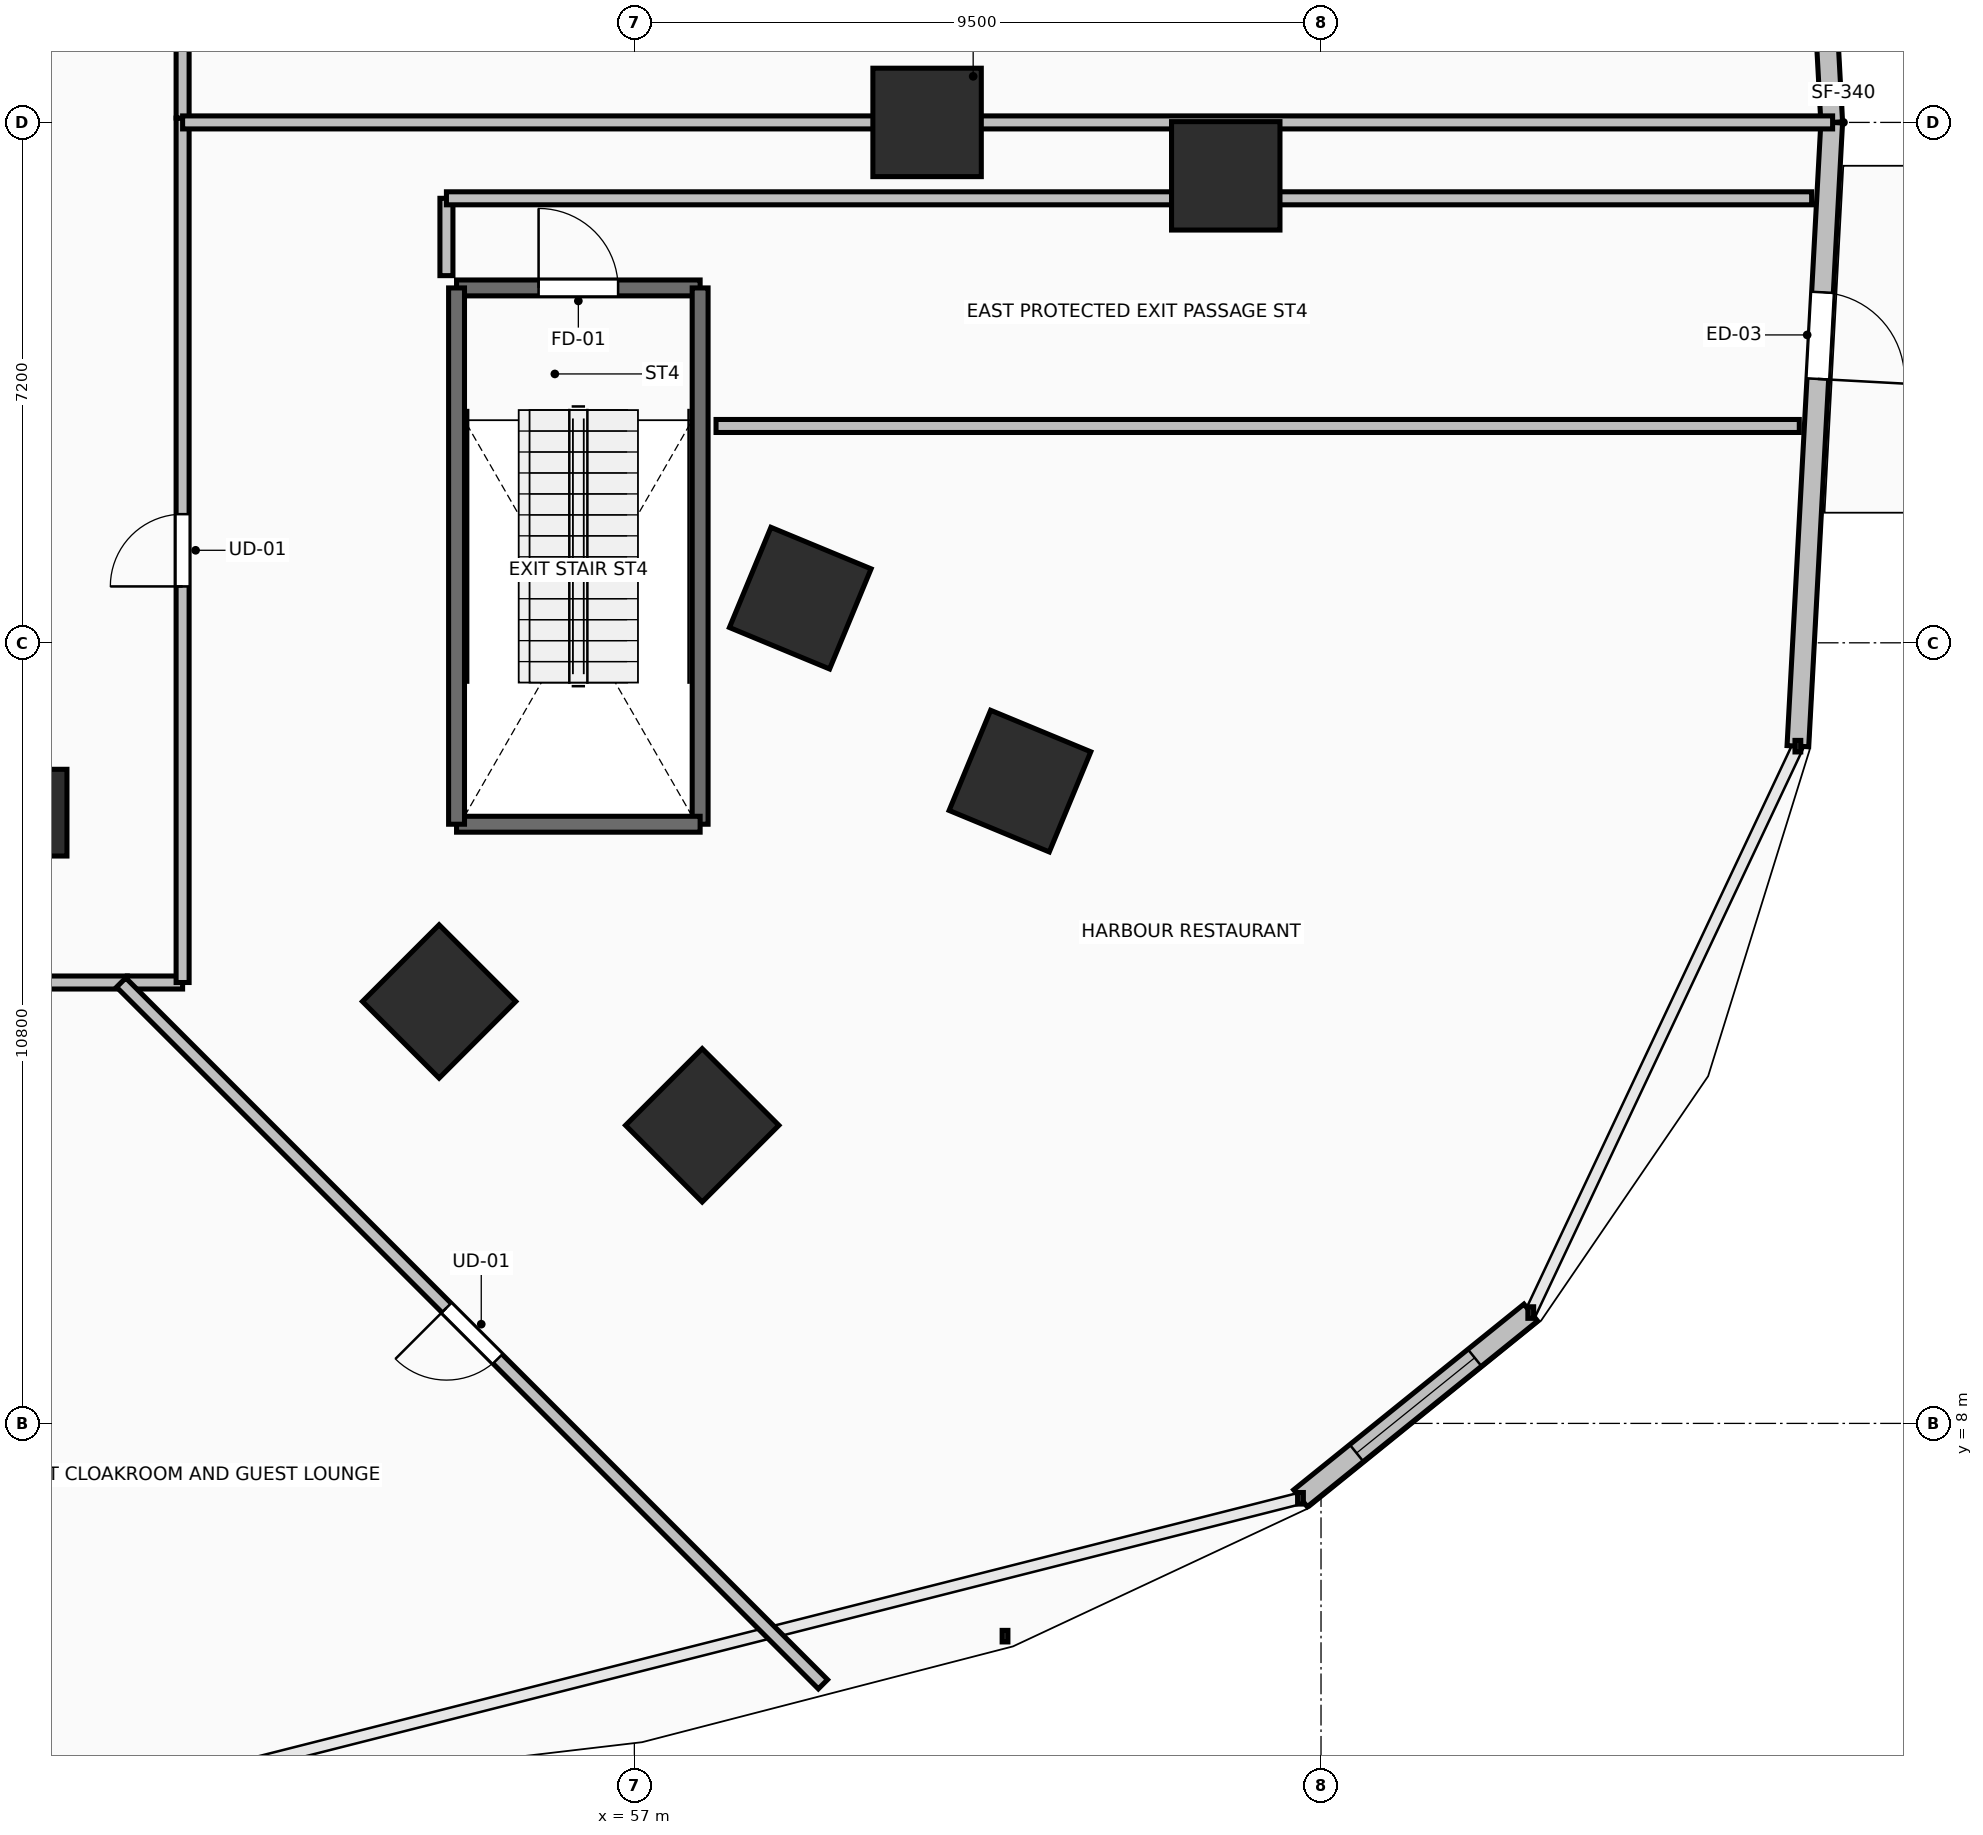
"""IFC4 building model, lengths in metres.
Left out: names, types, materials, properties, quantities, classifications, styles, units other than length and angle.
Written with IfcOpenShell. Run it as: python <this file> out.ifc"""

import sys

from ifc_helpers import new_model, si_unit, direction, frame, frame_2d, origin, origin_2d, place, context, subcontext, project, spatial, rectangle, extrude, element, fill, save


model = new_model("IFC4")
c1 = context("Model", 3, precision=1e-05, world=origin(), true_north=direction((0.0, 1.0)))
c2 = subcontext(c1, "Body", "Model", "MODEL_VIEW")
j1 = project(units=[si_unit("LENGTHUNIT", "METRE"), si_unit("PLANEANGLEUNIT", "RADIAN")], contexts=[c1])
p1 = place(None, origin())
s1 = spatial("IfcSite", under=j1, at=p1, CompositionType="ELEMENT")
p2 = place(p1, origin())
s2 = spatial("IfcBuilding", under=s1, at=p2, CompositionType="ELEMENT")
p3 = place(p2, origin())
s3 = spatial("IfcBuildingStorey", under=s2, at=p3, CompositionType="ELEMENT", Elevation=0.0)
for number, where, z_axis, x_axis in (
    (1, (61.05, 26.0, 0.0), (0.0, 0.0, 1.0), (1.0, 0.0, 0.0)),
    (2, (54.299, 13.838, 0.0), (0.0, 0.0, 1.0), (0.707, -0.707, 0.0)),
    (3, (59.295, 19.418, 0.0), (0.0, 0.0, 1.0), (0.924, -0.383, 0.0)),
    (4, (65.182, 25.261, 0.0), (0.0, 0.0, 1.0), (1.0, 0.0, 0.0)),
    (5, (57.939, 12.124, 0.0), (0.0, 0.0, 1.0), (0.707, -0.707, 0.0)),
    (6, (62.335, 16.886, 0.0), (0.0, 0.0, 1.0), (0.924, -0.383, 0.0)),
):
    element("IfcColumn", number, at=place(p3, frame(where, z_axis=z_axis, x_axis=x_axis)), inside=s3, PredefinedType="COLUMN", context=c2, shape_type="SweptSolid", body=[
        extrude(rectangle(XDim=1.5, YDim=1.5, at=origin_2d()), origin(), (0.0, 0.0, 1.0), 4.8),
    ])
p4 = place(p3, frame((48.75, 16.45, 0.0), z_axis=(0.0, 0.0, 1.0), x_axis=(1.0, 0.0, 0.0)))
e7 = element("IfcColumn", 7, at=p4, inside=s3, PredefinedType="PILASTER", context=c2, shape_type="SweptSolid", body=[
    extrude(rectangle(XDim=0.8, YDim=1.2, at=origin_2d()), origin(), (0.0, 0.0, 1.0), 4.8),
])
p5 = place(p3, frame((73.566, 26.0, 0.0), z_axis=(0.0, 0.0, 1.0), x_axis=(-0.054179266439, 0.998531224894, 0.0)))
e8 = element("IfcWall", 8, at=p5, inside=s3, PredefinedType="STANDARD", context=c2, shape_type="SweptSolid", body=[
    extrude(rectangle(XDim=8.643, YDim=0.3, at=frame_2d((4.321, 0.0))), origin(), (0.0, 0.0, 1.0), 4.48),
])
p6 = place(p5, frame((3.271, 0.0, 0.9)))
e9 = element("IfcOpeningElement", 9, at=p6, cuts=e8, PredefinedType="OPENING", context=c2, shape_type="SweptSolid", body=[
    extrude(rectangle(XDim=2.1, YDim=2.4, at=frame_2d((1.05, 1.2))), frame((0.0, 0.165, 0.0), z_axis=(0.0, -1.0, 0.0), x_axis=(1.0, 0.0, 0.0)), (0.0, 0.0, 1.0), 0.33),
])
p7 = place(p3, frame((66.216, 6.964, 0.0), z_axis=(0.0, 0.0, 1.0), x_axis=(0.778389533764, 0.627781597155, 0.0)))
e10 = element("IfcWall", 10, at=p7, inside=s3, PredefinedType="STANDARD", context=c2, shape_type="SweptSolid", body=[
    extrude(rectangle(XDim=4.093, YDim=0.3, at=frame_2d((2.046, 0.0))), origin(), (0.0, 0.0, 1.0), 4.48),
])
p8 = place(p7, frame((0.997, 0.0, 0.9)))
e11 = element("IfcOpeningElement", 11, at=p8, cuts=e10, PredefinedType="OPENING", context=c2, shape_type="SweptSolid", body=[
    extrude(rectangle(XDim=2.1, YDim=2.4, at=frame_2d((1.05, 1.2))), frame((0.0, 0.165, 0.0), z_axis=(0.0, -1.0, 0.0), x_axis=(1.0, 0.0, 0.0)), (0.0, 0.0, 1.0), 0.33),
])
p9 = place(p3, frame((73.097, 17.37, 0.0), z_axis=(0.0, 0.0, 1.0), x_axis=(0.054179266439, 0.998531224894, 0.0)))
e12 = element("IfcWall", 12, at=p9, inside=s3, PredefinedType="STANDARD", context=c2, shape_type="SweptSolid", body=[
    extrude(rectangle(XDim=8.643, YDim=0.3, at=frame_2d((4.321, 0.0))), origin(), (0.0, 0.0, 1.0), 4.48),
])
p10 = place(p9, frame((5.089, 0.0, 0.0)))
e13 = element("IfcOpeningElement", 13, at=p10, cuts=e12, PredefinedType="OPENING", context=c2, shape_type="SweptSolid", body=[
    extrude(rectangle(XDim=1.2, YDim=2.15, at=frame_2d((0.6, 1.075))), frame((0.0, 0.165, 0.0), z_axis=(0.0, -1.0, 0.0), x_axis=(1.0, 0.0, 0.0)), (0.0, 0.0, 1.0), 0.33),
])
p11 = place(p3, frame((54.54, 23.71, 0.0), z_axis=(0.0, 0.0, 1.0), x_axis=(1.0, 0.0, 0.0)))
e14 = element("IfcWall", 14, at=p11, inside=s3, PredefinedType="SOLIDWALL", context=c2, shape_type="SweptSolid", body=[
    extrude(rectangle(XDim=3.37, YDim=0.22, at=frame_2d((1.685, 0.0))), origin(), (0.0, 0.0, 1.0), 4.48),
])
p12 = place(p11, frame((1.135, 0.0, 0.0)))
e15 = element("IfcOpeningElement", 15, at=p12, cuts=e14, PredefinedType="OPENING", context=c2, shape_type="SweptSolid", body=[
    extrude(rectangle(XDim=1.1, YDim=2.15, at=frame_2d((0.55, 1.075))), frame((0.0, 0.125, 0.0), z_axis=(0.0, -1.0, 0.0), x_axis=(1.0, 0.0, 0.0)), (0.0, 0.0, 1.0), 0.25),
])
p13 = place(p3, frame((57.91, 23.71, 0.0), z_axis=(0.0, 0.0, 1.0), x_axis=(0.0, -1.0, 0.0)))
e16 = element("IfcWall", 16, at=p13, inside=s3, PredefinedType="SOLIDWALL", context=c2, shape_type="SweptSolid", body=[
    extrude(rectangle(XDim=7.42, YDim=0.22, at=frame_2d((3.71, 0.0))), origin(), (0.0, 0.0, 1.0), 4.48),
])
p14 = place(p3, frame((57.91, 16.29, 0.0), z_axis=(0.0, 0.0, 1.0), x_axis=(-1.0, 0.0, 0.0)))
e17 = element("IfcWall", 17, at=p14, inside=s3, PredefinedType="SOLIDWALL", context=c2, shape_type="SweptSolid", body=[
    extrude(rectangle(XDim=3.37, YDim=0.22, at=frame_2d((1.685, 0.0))), origin(), (0.0, 0.0, 1.0), 4.48),
])
p15 = place(p3, frame((54.54, 16.29, 0.0), z_axis=(0.0, 0.0, 1.0), x_axis=(0.0, 1.0, 0.0)))
e18 = element("IfcWall", 18, at=p15, inside=s3, PredefinedType="SOLIDWALL", context=c2, shape_type="SweptSolid", body=[
    extrude(rectangle(XDim=7.42, YDim=0.22, at=frame_2d((3.71, 0.0))), origin(), (0.0, 0.0, 1.0), 4.48),
])
p16 = place(p3, frame((42.994, 14.1, 0.0), z_axis=(0.0, 0.0, 1.0), x_axis=(1.0, 0.0, 0.0)))
e19 = element("IfcWall", 19, at=p16, inside=s3, PredefinedType="PARTITIONING", context=c2, shape_type="SweptSolid", body=[
    extrude(rectangle(XDim=6.991, YDim=0.18, at=frame_2d((3.496, 0.0))), origin(), (0.0, 0.0, 1.0), 3.672),
])
p17 = place(p16, frame((2.896, 0.0, 0.0)))
e20 = element("IfcOpeningElement", 20, at=p17, cuts=e19, PredefinedType="OPENING", context=c2, shape_type="SweptSolid", body=[
    extrude(rectangle(XDim=1.2, YDim=2.15, at=frame_2d((0.6, 1.075))), frame((0.0, 0.105, 0.0), z_axis=(0.0, -1.0, 0.0), x_axis=(1.0, 0.0, 0.0)), (0.0, 0.0, 1.0), 0.21),
])
p18 = place(p3, frame((49.985, 14.1, 0.0), z_axis=(0.0, 0.0, 1.0), x_axis=(1.0, 0.0, 0.0)))
e21 = element("IfcWall", 21, at=p18, inside=s3, PredefinedType="PARTITIONING", context=c2, shape_type="SweptSolid", body=[
    extrude(rectangle(XDim=0.765, YDim=0.18, at=frame_2d((0.382, 0.0))), origin(), (0.0, 0.0, 1.0), 4.212),
])
p19 = place(p3, frame((50.75, 14.1, 0.0), z_axis=(0.0, 0.0, 1.0), x_axis=(0.0, 1.0, 0.0)))
e22 = element("IfcWall", 22, at=p19, inside=s3, PredefinedType="PARTITIONING", context=c2, shape_type="SweptSolid", body=[
    extrude(rectangle(XDim=11.96, YDim=0.18, at=frame_2d((5.98, 0.0))), origin(), (0.0, 0.0, 1.0), 3.672),
])
p20 = place(p19, frame((5.48, 0.0, 0.0)))
e23 = element("IfcOpeningElement", 23, at=p20, cuts=e22, PredefinedType="OPENING", context=c2, shape_type="SweptSolid", body=[
    extrude(rectangle(XDim=1.0, YDim=2.15, at=frame_2d((0.5, 1.075))), frame((0.0, 0.105, 0.0), z_axis=(0.0, -1.0, 0.0), x_axis=(1.0, 0.0, 0.0)), (0.0, 0.0, 1.0), 0.21),
])
p21 = place(p3, frame((50.75, 26.06, 0.0), z_axis=(0.0, 0.0, 1.0), x_axis=(0.0, 1.0, 0.0)))
e24 = element("IfcWall", 24, at=p21, inside=s3, PredefinedType="PARTITIONING", context=c2, shape_type="SweptSolid", body=[
    extrude(rectangle(XDim=9.89, YDim=0.18, at=frame_2d((4.945, 0.0))), origin(), (0.0, 0.0, 1.0), 3.672),
])
p22 = place(p21, frame((4.245, 0.0, 0.0)))
e25 = element("IfcOpeningElement", 25, at=p22, cuts=e24, PredefinedType="OPENING", context=c2, shape_type="SweptSolid", body=[
    extrude(rectangle(XDim=1.4, YDim=2.2, at=frame_2d((0.7, 1.1))), frame((0.0, 0.105, 0.0), z_axis=(0.0, -1.0, 0.0), x_axis=(1.0, 0.0, 0.0)), (0.0, 0.0, 1.0), 0.21),
])
p23 = place(p3, frame((59.609, 4.391, 0.0), z_axis=(0.0, 0.0, 1.0), x_axis=(-0.707106781187, 0.707106781187, 0.0)))
e26 = element("IfcWall", 26, at=p23, inside=s3, PredefinedType="PARTITIONING", context=c2, shape_type="SweptSolid", body=[
    extrude(rectangle(XDim=13.73, YDim=0.18, at=frame_2d((6.865, 0.0))), origin(), (0.0, 0.0, 1.0), 3.769),
])
p24 = place(p23, frame((6.365, 0.0, 0.0)))
e27 = element("IfcOpeningElement", 27, at=p24, cuts=e26, PredefinedType="OPENING", context=c2, shape_type="SweptSolid", body=[
    extrude(rectangle(XDim=1.0, YDim=2.15, at=frame_2d((0.5, 1.075))), frame((0.0, 0.105, 0.0), z_axis=(0.0, -1.0, 0.0), x_axis=(1.0, 0.0, 0.0)), (0.0, 0.0, 1.0), 0.21),
])
p25 = place(p3, frame((73.578, 26.0, 0.0), z_axis=(0.0, 0.0, 1.0), x_axis=(-1.0, 0.0, 0.0)))
e28 = element("IfcWall", 28, at=p25, inside=s3, PredefinedType="PARTITIONING", context=c2, shape_type="SweptSolid", body=[
    extrude(rectangle(XDim=22.828, YDim=0.18, at=frame_2d((11.414, 0.0))), origin(), (0.0, 0.0, 1.0), 3.672),
])
p26 = place(p3, frame((54.4, 24.95, 0.0), z_axis=(0.0, 0.0, 1.0), x_axis=(0.0, -1.0, 0.0)))
e29 = element("IfcWall", 29, at=p26, inside=s3, PredefinedType="PARTITIONING", context=c2, shape_type="SweptSolid", body=[
    extrude(rectangle(XDim=1.07, YDim=0.18, at=frame_2d((0.535, 0.0))), origin(), (0.0, 0.0, 1.0), 4.48),
])
p27 = place(p3, frame((58.13, 21.8, 0.0), z_axis=(0.0, 0.0, 1.0), x_axis=(1.0, 0.0, 0.0)))
e30 = element("IfcWall", 30, at=p27, inside=s3, PredefinedType="PARTITIONING", context=c2, shape_type="SweptSolid", body=[
    extrude(rectangle(XDim=14.987, YDim=0.18, at=frame_2d((7.494, 0.0))), origin(), (0.0, 0.0, 1.0), 3.769),
])
p28 = place(p3, frame((73.288, 24.95, 0.0), z_axis=(0.0, 0.0, 1.0), x_axis=(-1.0, 0.0, 0.0)))
e31 = element("IfcWall", 31, at=p28, inside=s3, PredefinedType="PARTITIONING", context=c2, shape_type="SweptSolid", body=[
    extrude(rectangle(XDim=18.888, YDim=0.18, at=frame_2d((9.444, 0.0))), origin(), (0.0, 0.0, 1.0), 4.162),
])
p29 = place(p8, origin())
e32 = element("IfcWindow", 32, at=p29, inside=s3, PartitioningType="SINGLE_PANEL", PredefinedType="WINDOW", context=c2, shape_type="SweptSolid", body=[
    extrude(rectangle(XDim=2.1, YDim=2.4, at=frame_2d((1.05, 1.2))), frame((0.0, 0.03, 0.0), z_axis=(0.0, -1.0, 0.0), x_axis=(1.0, 0.0, 0.0)), (0.0, 0.0, 1.0), 0.06),
])
fill(e11, e32)
p30 = place(p10, frame((1.2, 0.0, 0.0), z_axis=(0.0, 0.0, 1.0), x_axis=(-1.0, 0.0, 0.0)))
e33 = element("IfcDoor", 33, at=p30, inside=s3, OperationType="SINGLE_SWING_LEFT", PredefinedType="DOOR", context=c2, shape_type="SweptSolid", body=[
    extrude(rectangle(XDim=1.2, YDim=2.15, at=frame_2d((0.6, 1.075))), frame((0.0, 0.025, 0.0), z_axis=(0.0, -1.0, 0.0), x_axis=(1.0, 0.0, 0.0)), (0.0, 0.0, 1.0), 0.05),
])
fill(e13, e33)
p31 = place(p12, origin())
e34 = element("IfcDoor", 34, at=p31, inside=s3, OperationType="SINGLE_SWING_LEFT", PredefinedType="DOOR", context=c2, shape_type="SweptSolid", body=[
    extrude(rectangle(XDim=1.1, YDim=2.15, at=frame_2d((0.55, 1.075))), frame((0.0, 0.025, 0.0), z_axis=(0.0, -1.0, 0.0), x_axis=(1.0, 0.0, 0.0)), (0.0, 0.0, 1.0), 0.05),
])
fill(e15, e34)
p32 = place(p20, origin())
e35 = element("IfcDoor", 35, at=p32, inside=s3, OperationType="SINGLE_SWING_LEFT", PredefinedType="DOOR", context=c2, shape_type="SweptSolid", body=[
    extrude(rectangle(XDim=1.0, YDim=2.15, at=frame_2d((0.5, 1.075))), frame((0.0, 0.025, 0.0), z_axis=(0.0, -1.0, 0.0), x_axis=(1.0, 0.0, 0.0)), (0.0, 0.0, 1.0), 0.05),
])
fill(e23, e35)
p33 = place(p24, origin())
e36 = element("IfcDoor", 36, at=p33, inside=s3, OperationType="SINGLE_SWING_RIGHT", PredefinedType="DOOR", context=c2, shape_type="SweptSolid", body=[
    extrude(rectangle(XDim=1.0, YDim=2.15, at=frame_2d((0.5, 1.075))), frame((0.0, 0.025, 0.0), z_axis=(0.0, -1.0, 0.0), x_axis=(1.0, 0.0, 0.0)), (0.0, 0.0, 1.0), 0.05),
])
fill(e27, e36)
save(model, sys.argv[1])
